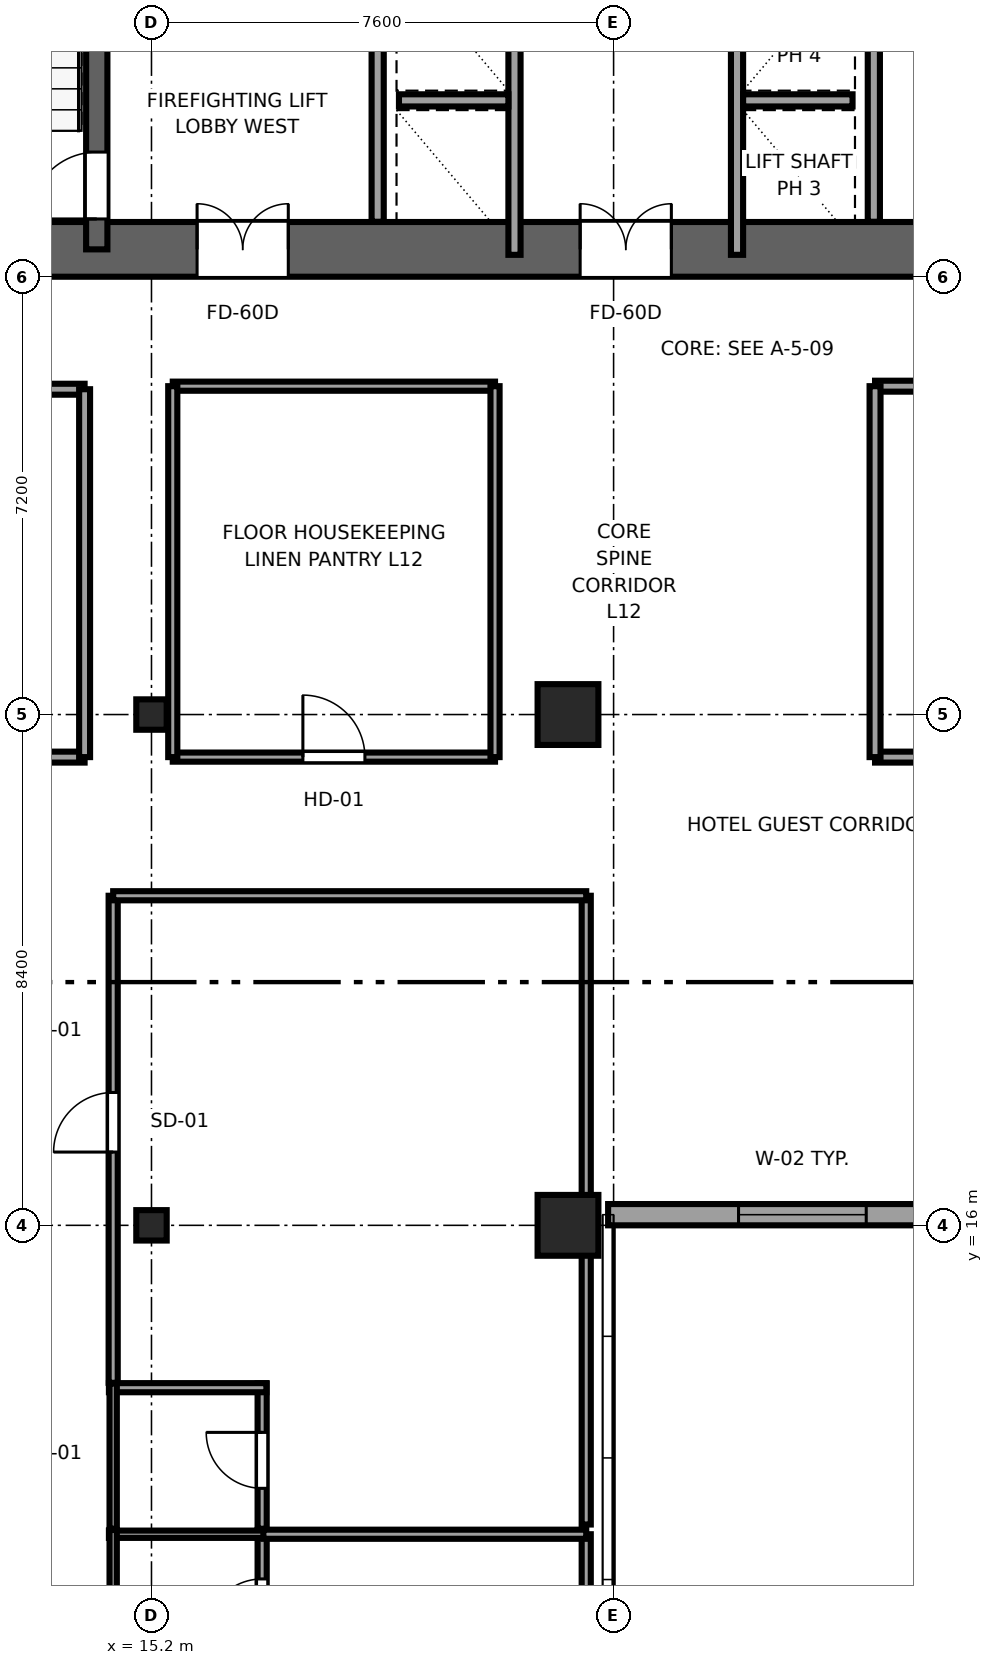
"""IFC4 building model, lengths in metres.
Left out: names, types, materials, properties, quantities, classifications, styles, units other than length and angle.
Written with IfcOpenShell. Run it as: python <this file> out.ifc"""

import sys

from ifc_helpers import new_model, si_unit, direction, frame, frame_2d, origin, origin_2d, place, context, subcontext, project, spatial, rectangle, i_section, extrude, source, transform, mapped, element, fill, save


model = new_model("IFC4")
c1 = context("Model", 3, precision=1e-05, world=origin(), true_north=direction((0.0, 1.0)))
c2 = subcontext(c1, "Body", "Model", "MODEL_VIEW")
j1 = project(units=[si_unit("LENGTHUNIT", "METRE"), si_unit("PLANEANGLEUNIT", "RADIAN")], contexts=[c1])
p1 = place(None, origin())
s1 = spatial("IfcSite", under=j1, at=p1, CompositionType="ELEMENT")
p2 = place(p1, origin())
s2 = spatial("IfcBuilding", under=s1, at=p2, CompositionType="ELEMENT")
p3 = place(p2, frame((0.0, 0.0, 53.3)))
s3 = spatial("IfcBuildingStorey", under=s2, at=p3, CompositionType="ELEMENT", Elevation=53.3)
p4 = place(p3, frame((9.6, 32.05, 0.0), z_axis=(0.0, 0.0, 1.0), x_axis=(1.0, 0.0, 0.0)))
e1 = element("IfcWall", 1, at=p4, inside=s3, PredefinedType="SHEAR", context=c2, shape_type="SweptSolid", body=[
    extrude(rectangle(XDim=26.8, YDim=0.9, at=frame_2d((13.4, 0.0))), origin(), (0.0, 0.0, 1.0), 3.55),
])
p5 = place(p4, frame((7.85, 0.0, 0.0), z_axis=(0.0, 0.0, 1.0), x_axis=(-1.0, 0.0, 0.0)))
e2 = element("IfcOpeningElement", 2, at=p5, cuts=e1, PredefinedType="OPENING", context=c2, shape_type="SweptSolid", body=[
    extrude(rectangle(XDim=1.5, YDim=2.04, at=frame_2d((0.75, 1.02))), frame((0.0, 0.46, 0.0), z_axis=(0.0, -1.0, 0.0), x_axis=(1.0, 0.0, 0.0)), (0.0, 0.0, 1.0), 0.92),
])
p6 = place(p4, frame((14.15, 0.0, 0.0), z_axis=(0.0, 0.0, 1.0), x_axis=(-1.0, 0.0, 0.0)))
e3 = element("IfcOpeningElement", 3, at=p6, cuts=e1, PredefinedType="OPENING", context=c2, shape_type="SweptSolid", body=[
    extrude(rectangle(XDim=1.5, YDim=2.04, at=frame_2d((0.75, 1.02))), frame((0.0, 0.46, 0.0), z_axis=(0.0, -1.0, 0.0), x_axis=(1.0, 0.0, 0.0)), (0.0, 0.0, 1.0), 0.92),
])
p7 = place(p4, frame((20.45, 0.0, 0.0), z_axis=(0.0, 0.0, 1.0), x_axis=(-1.0, 0.0, 0.0)))
e4 = element("IfcOpeningElement", 4, at=p7, cuts=e1, PredefinedType="OPENING", context=c2, shape_type="SweptSolid", body=[
    extrude(rectangle(XDim=1.5, YDim=2.04, at=frame_2d((0.75, 1.02))), frame((0.0, 0.46, 0.0), z_axis=(0.0, -1.0, 0.0), x_axis=(1.0, 0.0, 0.0)), (0.0, 0.0, 1.0), 0.92),
])
p8 = place(p3, frame((14.3, 32.05, 0.0), z_axis=(0.0, 0.0, 1.0), x_axis=(0.0, 1.0, 0.0)))
e5 = element("IfcWall", 5, at=p8, inside=s3, PredefinedType="SHEAR", context=c2, shape_type="SweptSolid", body=[
    extrude(rectangle(XDim=12.7, YDim=0.35, at=frame_2d((6.35, 0.0))), origin(), (0.0, 0.0, 1.0), 3.55),
])
p9 = place(p8, frame((0.5, 0.0, 0.0)))
e6 = element("IfcOpeningElement", 6, at=p9, cuts=e5, PredefinedType="OPENING", context=c2, shape_type="SweptSolid", body=[
    extrude(rectangle(XDim=1.1, YDim=2.12, at=frame_2d((0.55, 1.06))), frame((0.0, 0.185, 0.0), z_axis=(0.0, -1.0, 0.0), x_axis=(1.0, 0.0, 0.0)), (0.0, 0.0, 1.0), 0.37),
])
m1 = source(origin(), c2, "Body", "SweptSolid", [
    extrude(i_section(OverallWidth=0.5, OverallDepth=0.5, WebThickness=0.028, FlangeThickness=0.045, at=origin_2d()), origin(), (0.0, 0.0, 1.0), 3.55),
])
for number, where, z_axis, x_axis in (
    (7, (15.2, 16.0, 0.0), (0.0, 0.0, 1.0), (1.0, 0.0, 0.0)),
    (8, (15.2, 24.4, 0.0), (0.0, 0.0, 1.0), (1.0, 0.0, 0.0)),
):
    element("IfcColumn", number, at=place(p3, frame(where, z_axis=z_axis, x_axis=x_axis)), inside=s3, PredefinedType="COLUMN", context=c2, shape_type="MappedRepresentation", body=[
        mapped(m1, transform((0.0, 0.0, 0.0), x_axis=(1.0, 0.0, 0.0), y_axis=(0.0, 1.0, 0.0), z_axis=(0.0, 0.0, 1.0), scale=1.0)),
    ])
m2 = source(origin(), c2, "Body", "SweptSolid", [
    extrude(rectangle(XDim=1.0, YDim=1.0, at=origin_2d()), origin(), (0.0, 0.0, 1.0), 3.55),
])
for number, where, z_axis, x_axis in (
    (9, (22.05, 16.0, 0.0), (0.0, 0.0, 1.0), (1.0, 0.0, 0.0)),
    (10, (22.05, 24.4, 0.0), (0.0, 0.0, 1.0), (1.0, 0.0, 0.0)),
):
    element("IfcColumn", number, at=place(p3, frame(where, z_axis=z_axis, x_axis=x_axis)), inside=s3, PredefinedType="COLUMN", context=c2, shape_type="MappedRepresentation", body=[
        mapped(m2, transform((0.0, 0.0, 0.0), x_axis=(1.0, 0.0, 0.0), y_axis=(0.0, 1.0, 0.0), z_axis=(0.0, 0.0, 1.0), scale=1.0)),
    ])
p10 = place(p3, frame((22.71, 16.175, 0.0), z_axis=(0.0, 0.0, 1.0), x_axis=(1.0, 0.0, 0.0)))
e11 = element("IfcWall", 11, at=p10, inside=s3, PredefinedType="SOLIDWALL", context=c2, shape_type="SweptSolid", body=[
    extrude(rectangle(XDim=11.58, YDim=0.35, at=frame_2d((5.79, 0.0))), origin(), (0.0, 0.0, 1.0), 2.748),
])
p11 = place(p10, frame((2.145, 0.0, 0.68)))
e12 = element("IfcOpeningElement", 12, at=p11, cuts=e11, PredefinedType="OPENING", context=c2, shape_type="SweptSolid", body=[
    extrude(rectangle(XDim=2.1, YDim=1.9, at=frame_2d((1.05, 0.95))), frame((0.0, 0.185, 0.0), z_axis=(0.0, -1.0, 0.0), x_axis=(1.0, 0.0, 0.0)), (0.0, 0.0, 1.0), 0.37),
])
p12 = place(p10, frame((7.335, 0.0, 0.68)))
e13 = element("IfcOpeningElement", 13, at=p12, cuts=e11, PredefinedType="OPENING", context=c2, shape_type="SweptSolid", body=[
    extrude(rectangle(XDim=2.1, YDim=1.9, at=frame_2d((1.05, 0.95))), frame((0.0, 0.185, 0.0), z_axis=(0.0, -1.0, 0.0), x_axis=(1.0, 0.0, 0.0)), (0.0, 0.0, 1.0), 0.37),
])
for number, where, z_axis, x_axis in (
    (14, (18.92, 32.504, 0.0), (0.0, 0.0, 1.0), (0.0, 1.0, 0.0)),
    (15, (27.08, 32.504, 0.0), (0.0, 0.0, 1.0), (0.0, 1.0, 0.0)),
):
    element("IfcWall", number, at=place(p3, frame(where, z_axis=z_axis, x_axis=x_axis)), inside=s3, PredefinedType="SOLIDWALL", context=c2, shape_type="SweptSolid", body=[
        extrude(rectangle(XDim=3.646, YDim=0.2, at=frame_2d((1.823, 0.0))), origin(), (0.0, 0.0, 1.0), 3.37),
    ])
p13 = place(p3, frame((21.17, 31.96, 0.0), z_axis=(0.0, 0.0, 1.0), x_axis=(0.0, 1.0, 0.0)))
e16 = element("IfcWall", 16, at=p13, inside=s3, PredefinedType="SOLIDWALL", context=c2, shape_type="SweptSolid", body=[
    extrude(rectangle(XDim=12.58, YDim=0.2, at=frame_2d((6.29, 0.0))), origin(), (0.0, 0.0, 1.0), 3.37),
])
p14 = place(p3, frame((19.27, 34.5, 0.0), z_axis=(0.0, 0.0, 1.0), x_axis=(1.0, 0.0, 0.0)))
e17 = element("IfcWall", 17, at=p14, inside=s3, PredefinedType="SOLIDWALL", context=c2, shape_type="SweptSolid", body=[
    extrude(rectangle(XDim=1.8, YDim=0.2, at=frame_2d((0.9, 0.0))), origin(), (0.0, 0.0, 1.0), 3.37),
])
p15 = place(p3, frame((24.83, 31.96, 0.0), z_axis=(0.0, 0.0, 1.0), x_axis=(0.0, 1.0, 0.0)))
e18 = element("IfcWall", 18, at=p15, inside=s3, PredefinedType="SOLIDWALL", context=c2, shape_type="SweptSolid", body=[
    extrude(rectangle(XDim=12.58, YDim=0.2, at=frame_2d((6.29, 0.0))), origin(), (0.0, 0.0, 1.0), 3.37),
])
p16 = place(p3, frame((24.93, 34.5, 0.0), z_axis=(0.0, 0.0, 1.0), x_axis=(1.0, 0.0, 0.0)))
e19 = element("IfcWall", 19, at=p16, inside=s3, PredefinedType="SOLIDWALL", context=c2, shape_type="SweptSolid", body=[
    extrude(rectangle(XDim=1.8, YDim=0.2, at=frame_2d((0.9, 0.0))), origin(), (0.0, 0.0, 1.0), 3.37),
])
p17 = place(p3, frame((17.02, 8.6, 0.0), z_axis=(0.0, 0.0, 1.0), x_axis=(0.0, 1.0, 0.0)))
e20 = element("IfcWall", 20, at=p17, inside=s3, PredefinedType="PARTITIONING", context=c2, shape_type="SweptSolid", body=[
    extrude(rectangle(XDim=2.39, YDim=0.15, at=frame_2d((1.195, 0.0))), origin(), (0.0, 0.0, 1.0), 3.37),
])
p18 = place(p17, frame((0.665, 0.0, 0.0)))
e21 = element("IfcOpeningElement", 21, at=p18, cuts=e20, PredefinedType="OPENING", context=c2, shape_type="SweptSolid", body=[
    extrude(rectangle(XDim=0.92, YDim=2.01, at=frame_2d((0.46, 1.005))), frame((0.0, 0.085, 0.0), z_axis=(0.0, -1.0, 0.0), x_axis=(1.0, 0.0, 0.0)), (0.0, 0.0, 1.0), 0.17),
])
p19 = place(p3, frame((14.5, 10.92, 0.0), z_axis=(0.0, 0.0, 1.0), x_axis=(1.0, 0.0, 0.0)))
e22 = element("IfcWall", 22, at=p19, inside=s3, PredefinedType="PLUMBINGWALL", context=c2, shape_type="SweptSolid", body=[
    extrude(rectangle(XDim=2.59, YDim=0.12, at=frame_2d((1.295, 0.0))), origin(), (0.0, 0.0, 1.0), 3.37),
])
p20 = place(p3, frame((14.57, 8.6, 0.0), z_axis=(0.0, 0.0, 1.0), x_axis=(0.0, 1.0, 0.0)))
e23 = element("IfcWall", 23, at=p20, inside=s3, PredefinedType="PLUMBINGWALL", context=c2, shape_type="SweptSolid", body=[
    extrude(rectangle(XDim=2.39, YDim=0.12, at=frame_2d((1.195, 0.0))), origin(), (0.0, 0.0, 1.0), 3.37),
])
p21 = place(p3, frame((17.02, 11.01, 0.0), z_axis=(0.0, 0.0, 1.0), x_axis=(0.0, 1.0, 0.0)))
e24 = element("IfcWall", 24, at=p21, inside=s3, PredefinedType="PARTITIONING", context=c2, shape_type="SweptSolid", body=[
    extrude(rectangle(XDim=2.39, YDim=0.15, at=frame_2d((1.195, 0.0))), origin(), (0.0, 0.0, 1.0), 3.37),
])
p22 = place(p21, frame((0.665, 0.0, 0.0)))
e25 = element("IfcOpeningElement", 25, at=p22, cuts=e24, PredefinedType="OPENING", context=c2, shape_type="SweptSolid", body=[
    extrude(rectangle(XDim=0.92, YDim=2.01, at=frame_2d((0.46, 1.005))), frame((0.0, 0.085, 0.0), z_axis=(0.0, -1.0, 0.0), x_axis=(1.0, 0.0, 0.0)), (0.0, 0.0, 1.0), 0.17),
])
p23 = place(p3, frame((14.5, 13.33, 0.0), z_axis=(0.0, 0.0, 1.0), x_axis=(1.0, 0.0, 0.0)))
e26 = element("IfcWall", 26, at=p23, inside=s3, PredefinedType="PARTITIONING", context=c2, shape_type="SweptSolid", body=[
    extrude(rectangle(XDim=2.59, YDim=0.15, at=frame_2d((1.295, 0.0))), origin(), (0.0, 0.0, 1.0), 3.37),
])
p24 = place(p3, frame((14.57, 11.01, 0.0), z_axis=(0.0, 0.0, 1.0), x_axis=(0.0, 1.0, 0.0)))
e27 = element("IfcWall", 27, at=p24, inside=s3, PredefinedType="PLUMBINGWALL", context=c2, shape_type="SweptSolid", body=[
    extrude(rectangle(XDim=2.39, YDim=0.12, at=frame_2d((1.195, 0.0))), origin(), (0.0, 0.0, 1.0), 3.37),
])
p25 = place(p3, frame((22.35, 0.405, 0.0), z_axis=(0.0, 0.0, 1.0), x_axis=(0.0, 1.0, 0.0)))
e28 = element("IfcWall", 28, at=p25, inside=s3, PredefinedType="PARTITIONING", context=c2, shape_type="SweptSolid", body=[
    extrude(rectangle(XDim=10.515, YDim=0.15, at=frame_2d((5.257, 0.0))), origin(), (0.0, 0.0, 1.0), 3.37),
])
p26 = place(p3, frame((17.04, 10.92, 0.0), z_axis=(0.0, 0.0, 1.0), x_axis=(1.0, 0.0, 0.0)))
e29 = element("IfcWall", 29, at=p26, inside=s3, PredefinedType="PARTITIONING", context=c2, shape_type="SweptSolid", body=[
    extrude(rectangle(XDim=5.31, YDim=0.15, at=frame_2d((2.655, 0.0))), origin(), (0.0, 0.0, 1.0), 3.37),
])
p27 = place(p3, frame((14.57, 13.41, 0.0), z_axis=(0.0, 0.0, 1.0), x_axis=(0.0, 1.0, 0.0)))
e30 = element("IfcWall", 30, at=p27, inside=s3, PredefinedType="PARTITIONING", context=c2, shape_type="SweptSolid", body=[
    extrude(rectangle(XDim=8.01, YDim=0.15, at=frame_2d((4.005, 0.0))), origin(), (0.0, 0.0, 1.0), 3.37),
])
p28 = place(p27, frame((3.795, 0.0, 0.0)))
e31 = element("IfcOpeningElement", 31, at=p28, cuts=e30, PredefinedType="OPENING", context=c2, shape_type="SweptSolid", body=[
    extrude(rectangle(XDim=0.98, YDim=2.12, at=frame_2d((0.49, 1.06))), frame((0.0, 0.085, 0.0), z_axis=(0.0, -1.0, 0.0), x_axis=(1.0, 0.0, 0.0)), (0.0, 0.0, 1.0), 0.17),
])
p29 = place(p3, frame((22.35, 11.08, 0.0), z_axis=(0.0, 0.0, 1.0), x_axis=(0.0, 1.0, 0.0)))
e32 = element("IfcWall", 32, at=p29, inside=s3, PredefinedType="PARTITIONING", context=c2, shape_type="SweptSolid", body=[
    extrude(rectangle(XDim=10.34, YDim=0.15, at=frame_2d((5.17, 0.0))), origin(), (0.0, 0.0, 1.0), 3.37),
])
p30 = place(p3, frame((14.57, 21.42, 0.0), z_axis=(0.0, 0.0, 1.0), x_axis=(1.0, 0.0, 0.0)))
e33 = element("IfcWall", 33, at=p30, inside=s3, PredefinedType="PARTITIONING", context=c2, shape_type="SweptSolid", body=[
    extrude(rectangle(XDim=7.78, YDim=0.15, at=frame_2d((3.89, 0.0))), origin(), (0.0, 0.0, 1.0), 3.37),
])
p31 = place(p3, frame((9.88, 23.7, 0.0), z_axis=(0.0, 0.0, 1.0), x_axis=(1.0, 0.0, 0.0)))
e34 = element("IfcWall", 34, at=p31, inside=s3, PredefinedType="PARTITIONING", context=c2, shape_type="SweptSolid", body=[
    extrude(rectangle(XDim=4.22, YDim=0.18, at=frame_2d((2.11, 0.0))), origin(), (0.0, 0.0, 1.0), 3.37),
])
p32 = place(p31, frame((1.285, 0.0, 0.0)))
e35 = element("IfcOpeningElement", 35, at=p32, cuts=e34, PredefinedType="OPENING", context=c2, shape_type="SweptSolid", body=[
    extrude(rectangle(XDim=1.65, YDim=2.15, at=frame_2d((0.825, 1.075))), frame((0.0, 0.1, 0.0), z_axis=(0.0, -1.0, 0.0), x_axis=(1.0, 0.0, 0.0)), (0.0, 0.0, 1.0), 0.2),
])
p33 = place(p3, frame((9.88, 29.75, 0.0), z_axis=(0.0, 0.0, 1.0), x_axis=(1.0, 0.0, 0.0)))
e36 = element("IfcWall", 36, at=p33, inside=s3, PredefinedType="PARTITIONING", context=c2, shape_type="SweptSolid", body=[
    extrude(rectangle(XDim=4.22, YDim=0.18, at=frame_2d((2.11, 0.0))), origin(), (0.0, 0.0, 1.0), 3.37),
])
p34 = place(p3, frame((14.1, 23.7, 0.0), z_axis=(0.0, 0.0, 1.0), x_axis=(0.0, 1.0, 0.0)))
e37 = element("IfcWall", 37, at=p34, inside=s3, PredefinedType="PARTITIONING", context=c2, shape_type="SweptSolid", body=[
    extrude(rectangle(XDim=6.05, YDim=0.18, at=frame_2d((3.025, 0.0))), origin(), (0.0, 0.0, 1.0), 3.37),
])
p35 = place(p3, frame((27.1, 23.7, 0.0), z_axis=(0.0, 0.0, 1.0), x_axis=(1.0, 0.0, 0.0)))
e38 = element("IfcWall", 38, at=p35, inside=s3, PredefinedType="PARTITIONING", context=c2, shape_type="SweptSolid", body=[
    extrude(rectangle(XDim=7.3, YDim=0.18, at=frame_2d((3.65, 0.0))), origin(), (0.0, 0.0, 1.0), 3.37),
])
p36 = place(p35, frame((2.825, 0.0, 0.0)))
e39 = element("IfcOpeningElement", 39, at=p36, cuts=e38, PredefinedType="OPENING", context=c2, shape_type="SweptSolid", body=[
    extrude(rectangle(XDim=1.65, YDim=2.15, at=frame_2d((0.825, 1.075))), frame((0.0, 0.1, 0.0), z_axis=(0.0, -1.0, 0.0), x_axis=(1.0, 0.0, 0.0)), (0.0, 0.0, 1.0), 0.2),
])
p37 = place(p3, frame((27.1, 29.8, 0.0), z_axis=(0.0, 0.0, 1.0), x_axis=(1.0, 0.0, 0.0)))
e40 = element("IfcWall", 40, at=p37, inside=s3, PredefinedType="PARTITIONING", context=c2, shape_type="SweptSolid", body=[
    extrude(rectangle(XDim=7.3, YDim=0.18, at=frame_2d((3.65, 0.0))), origin(), (0.0, 0.0, 1.0), 3.37),
])
p38 = place(p3, frame((27.1, 23.7, 0.0), z_axis=(0.0, 0.0, 1.0), x_axis=(0.0, 1.0, 0.0)))
e41 = element("IfcWall", 41, at=p38, inside=s3, PredefinedType="PARTITIONING", context=c2, shape_type="SweptSolid", body=[
    extrude(rectangle(XDim=6.1, YDim=0.18, at=frame_2d((3.05, 0.0))), origin(), (0.0, 0.0, 1.0), 3.37),
])
p39 = place(p3, frame((15.55, 23.7, 0.0), z_axis=(0.0, 0.0, 1.0), x_axis=(1.0, 0.0, 0.0)))
e42 = element("IfcWall", 42, at=p39, inside=s3, PredefinedType="PARTITIONING", context=c2, shape_type="SweptSolid", body=[
    extrude(rectangle(XDim=5.3, YDim=0.15, at=frame_2d((2.65, 0.0))), origin(), (0.0, 0.0, 1.0), 3.37),
])
p40 = place(p39, frame((2.14, 0.0, 0.0)))
e43 = element("IfcOpeningElement", 43, at=p40, cuts=e42, PredefinedType="OPENING", context=c2, shape_type="SweptSolid", body=[
    extrude(rectangle(XDim=1.02, YDim=2.03, at=frame_2d((0.51, 1.015))), frame((0.0, 0.085, 0.0), z_axis=(0.0, -1.0, 0.0), x_axis=(1.0, 0.0, 0.0)), (0.0, 0.0, 1.0), 0.17),
])
p41 = place(p3, frame((15.55, 29.8, 0.0), z_axis=(0.0, 0.0, 1.0), x_axis=(1.0, 0.0, 0.0)))
e44 = element("IfcWall", 44, at=p41, inside=s3, PredefinedType="PARTITIONING", context=c2, shape_type="SweptSolid", body=[
    extrude(rectangle(XDim=5.3, YDim=0.15, at=frame_2d((2.65, 0.0))), origin(), (0.0, 0.0, 1.0), 3.37),
])
for number, where, z_axis, x_axis in (
    (45, (15.55, 23.7, 0.0), (0.0, 0.0, 1.0), (0.0, 1.0, 0.0)),
    (46, (20.85, 23.7, 0.0), (0.0, 0.0, 1.0), (0.0, 1.0, 0.0)),
):
    element("IfcWall", number, at=place(p3, frame(where, z_axis=z_axis, x_axis=x_axis)), inside=s3, PredefinedType="PARTITIONING", context=c2, shape_type="SweptSolid", body=[
        extrude(rectangle(XDim=6.1, YDim=0.15, at=frame_2d((3.05, 0.0))), origin(), (0.0, 0.0, 1.0), 3.37),
    ])
m3 = source(origin(), c2, "Body", "SweptSolid", [
    extrude(rectangle(XDim=2.1, YDim=1.9, at=frame_2d((1.05, 0.95))), frame((0.0, 0.09, 0.0), z_axis=(0.0, -1.0, 0.0), x_axis=(1.0, 0.0, 0.0)), (0.0, 0.0, 1.0), 0.06),
])
p42 = place(p11, origin())
e47 = element("IfcWindow", 47, at=p42, inside=s3, PartitioningType="TRIPLE_PANEL_HORIZONTAL", PredefinedType="WINDOW", context=c2, shape_type="MappedRepresentation", body=[
    mapped(m3, transform((0.0, 0.0, 0.0), x_axis=(1.0, 0.0, 0.0), y_axis=(0.0, 1.0, 0.0), z_axis=(0.0, 0.0, 1.0), scale=1.0)),
])
fill(e12, e47)
m4 = source(origin(), c2, "Body", "SweptSolid", [
    extrude(rectangle(XDim=1.1, YDim=2.12, at=frame_2d((0.55, 1.06))), frame((0.0, 0.025, 0.0), z_axis=(0.0, -1.0, 0.0), x_axis=(1.0, 0.0, 0.0)), (0.0, 0.0, 1.0), 0.05),
])
p43 = place(p9, origin())
e48 = element("IfcDoor", 48, at=p43, inside=s3, OperationType="SINGLE_SWING_LEFT", PredefinedType="DOOR", context=c2, shape_type="MappedRepresentation", body=[
    mapped(m4, transform((0.0, 0.0, 0.0), x_axis=(1.0, 0.0, 0.0), y_axis=(0.0, 1.0, 0.0), z_axis=(0.0, 0.0, 1.0), scale=1.0)),
])
fill(e6, e48)
m5 = source(origin(), c2, "Body", "SweptSolid", [
    extrude(rectangle(XDim=1.5, YDim=2.04, at=frame_2d((0.75, 1.02))), frame((0.0, 0.025, 0.0), z_axis=(0.0, -1.0, 0.0), x_axis=(1.0, 0.0, 0.0)), (0.0, 0.0, 1.0), 0.05),
])
p44 = place(p5, origin())
e49 = element("IfcDoor", 49, at=p44, inside=s3, OperationType="DOUBLE_DOOR_SINGLE_SWING", PredefinedType="DOOR", context=c2, shape_type="MappedRepresentation", body=[
    mapped(m5, transform((0.0, 0.0, 0.0), x_axis=(1.0, 0.0, 0.0), y_axis=(0.0, 1.0, 0.0), z_axis=(0.0, 0.0, 1.0), scale=1.0)),
])
fill(e2, e49)
p45 = place(p6, origin())
e50 = element("IfcDoor", 50, at=p45, inside=s3, OperationType="DOUBLE_DOOR_SINGLE_SWING", PredefinedType="DOOR", context=c2, shape_type="MappedRepresentation", body=[
    mapped(m5, transform((0.0, 0.0, 0.0), x_axis=(1.0, 0.0, 0.0), y_axis=(0.0, 1.0, 0.0), z_axis=(0.0, 0.0, 1.0), scale=1.0)),
])
fill(e3, e50)
m6 = source(origin(), c2, "Body", "SweptSolid", [
    extrude(rectangle(XDim=0.92, YDim=2.01, at=frame_2d((0.46, 1.005))), frame((0.0, 0.025, 0.0), z_axis=(0.0, -1.0, 0.0), x_axis=(1.0, 0.0, 0.0)), (0.0, 0.0, 1.0), 0.05),
])
p46 = place(p18, origin())
e51 = element("IfcDoor", 51, at=p46, inside=s3, OperationType="SINGLE_SWING_LEFT", PredefinedType="DOOR", context=c2, shape_type="MappedRepresentation", body=[
    mapped(m6, transform((0.0, 0.0, 0.0), x_axis=(1.0, 0.0, 0.0), y_axis=(0.0, 1.0, 0.0), z_axis=(0.0, 0.0, 1.0), scale=1.0)),
])
fill(e21, e51)
p47 = place(p22, origin())
e52 = element("IfcDoor", 52, at=p47, inside=s3, OperationType="SINGLE_SWING_RIGHT", PredefinedType="DOOR", context=c2, shape_type="MappedRepresentation", body=[
    mapped(m6, transform((0.0, 0.0, 0.0), x_axis=(1.0, 0.0, 0.0), y_axis=(0.0, 1.0, 0.0), z_axis=(0.0, 0.0, 1.0), scale=1.0)),
])
fill(e25, e52)
m7 = source(origin(), c2, "Body", "SweptSolid", [
    extrude(rectangle(XDim=0.98, YDim=2.12, at=frame_2d((0.49, 1.06))), frame((0.0, 0.025, 0.0), z_axis=(0.0, -1.0, 0.0), x_axis=(1.0, 0.0, 0.0)), (0.0, 0.0, 1.0), 0.05),
])
p48 = place(p28, origin())
e53 = element("IfcDoor", 53, at=p48, inside=s3, OperationType="SINGLE_SWING_LEFT", PredefinedType="DOOR", context=c2, shape_type="MappedRepresentation", body=[
    mapped(m7, transform((0.0, 0.0, 0.0), x_axis=(1.0, 0.0, 0.0), y_axis=(0.0, 1.0, 0.0), z_axis=(0.0, 0.0, 1.0), scale=1.0)),
])
fill(e31, e53)
m8 = source(origin(), c2, "Body", "SweptSolid", [
    extrude(rectangle(XDim=1.02, YDim=2.03, at=frame_2d((0.51, 1.015))), frame((0.0, 0.025, 0.0), z_axis=(0.0, -1.0, 0.0), x_axis=(1.0, 0.0, 0.0)), (0.0, 0.0, 1.0), 0.05),
])
p49 = place(p40, origin())
e54 = element("IfcDoor", 54, at=p49, inside=s3, OperationType="SINGLE_SWING_LEFT", PredefinedType="DOOR", context=c2, shape_type="MappedRepresentation", body=[
    mapped(m8, transform((0.0, 0.0, 0.0), x_axis=(1.0, 0.0, 0.0), y_axis=(0.0, 1.0, 0.0), z_axis=(0.0, 0.0, 1.0), scale=1.0)),
])
fill(e43, e54)
save(model, sys.argv[1])
